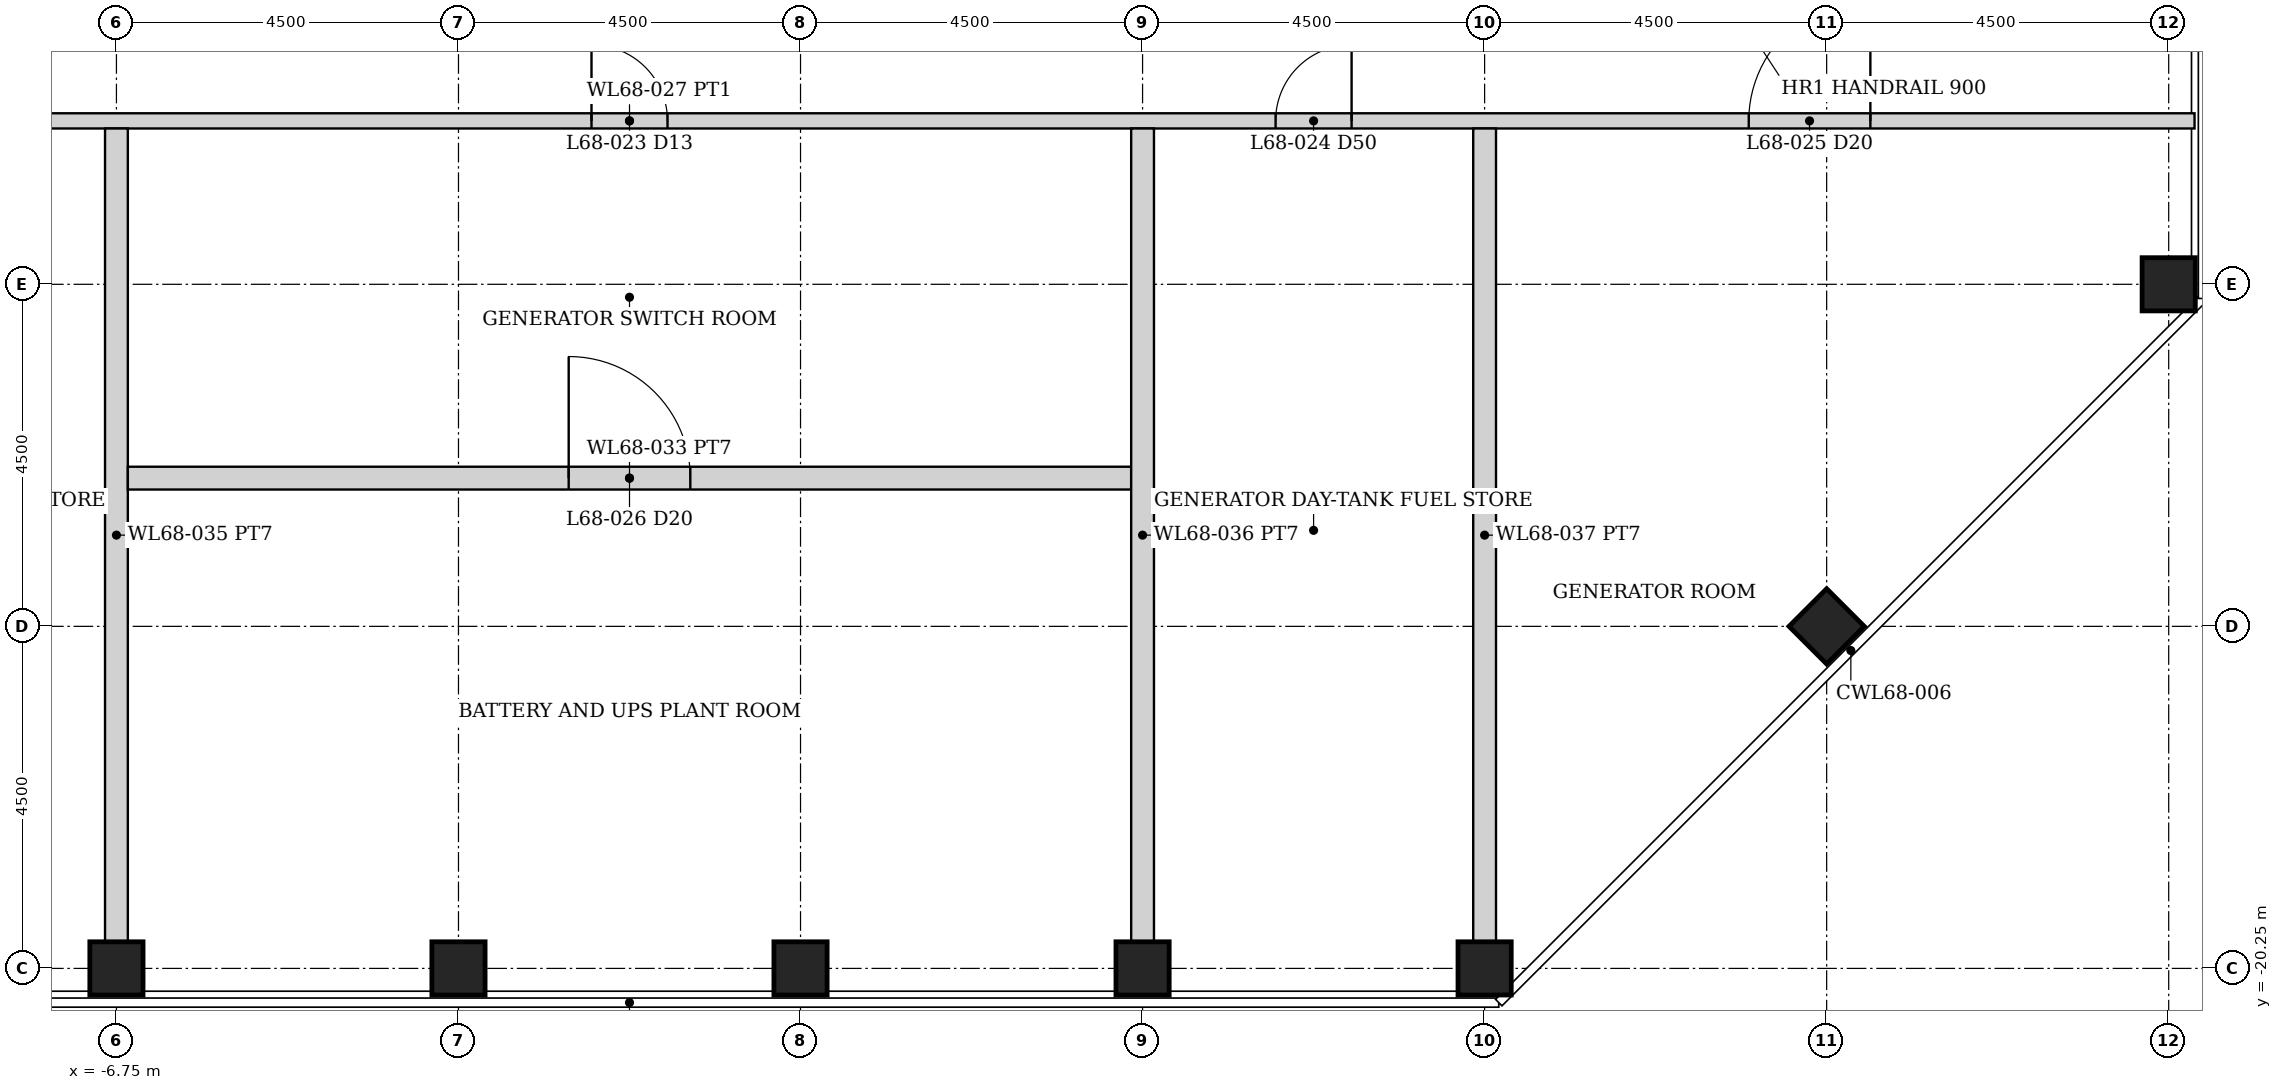
"""IFC4 building model, lengths in metres.
Left out: names, types, materials, properties, quantities, classifications, styles, units other than length and angle.
Written with IfcOpenShell. Run it as: python <this file> out.ifc"""

import sys

from ifc_helpers import new_model, si_unit, direction, frame, frame_2d, origin, origin_2d, place, context, subcontext, project, spatial, rectangle, hollow_rectangle, extrude, element, fill, save


model = new_model("IFC4")
c1 = context("Model", 3, precision=1e-05, world=origin(), true_north=direction((0.0, 1.0)))
c2 = subcontext(c1, "Body", "Model", "MODEL_VIEW")
j1 = project(units=[si_unit("LENGTHUNIT", "METRE"), si_unit("PLANEANGLEUNIT", "RADIAN")], contexts=[c1])
p1 = place(None, origin())
s1 = spatial("IfcSite", under=j1, at=p1, CompositionType="ELEMENT")
p2 = place(p1, origin())
s2 = spatial("IfcBuilding", under=s1, at=p2, CompositionType="ELEMENT")
p3 = place(p2, frame((0.0, 0.0, 262.05)))
s3 = spatial("IfcBuildingStorey", under=s2, at=p3, CompositionType="ELEMENT", Elevation=262.05)
for number, where, z_axis, x_axis in (
    (1, (20.25, -11.25, 0.0), (0.0, 0.0, 1.0), (1.0, 0.0, 0.0)),
    (2, (-6.75, -20.25, 0.0), (0.0, 0.0, 1.0), (0.0, 1.0, 0.0)),
    (3, (-2.25, -20.25, 0.0), (0.0, 0.0, 1.0), (0.0, 1.0, 0.0)),
    (4, (2.25, -20.25, 0.0), (0.0, 0.0, 1.0), (0.0, 1.0, 0.0)),
    (5, (6.75, -20.25, 0.0), (0.0, 0.0, 1.0), (0.0, 1.0, 0.0)),
    (6, (11.25, -20.25, 0.0), (0.0, 0.0, 1.0), (0.0, 1.0, 0.0)),
    (7, (15.75, -15.75, 0.0), (0.0, 0.0, 1.0), (0.707, -0.707, 0.0)),
):
    element("IfcColumn", number, at=place(p3, frame(where, z_axis=z_axis, x_axis=x_axis)), inside=s3, PredefinedType="COLUMN", context=c2, shape_type="SweptSolid", body=[
        extrude(hollow_rectangle(XDim=0.7, YDim=0.7, WallThickness=0.035, at=origin_2d()), origin(), (0.0, 0.0, 1.0), 6.0),
    ])
p4 = place(p3, frame((-20.59, -9.1, 0.0), z_axis=(0.0, 0.0, 1.0), x_axis=(1.0, 0.0, 0.0)))
e8 = element("IfcWall", 8, at=p4, inside=s3, PredefinedType="PARTITIONING", context=c2, shape_type="SweptSolid", body=[
    extrude(rectangle(XDim=41.18, YDim=0.2, at=frame_2d((20.59, 0.0))), origin(), (0.0, 0.0, 1.0), 4.823),
])
p5 = place(p4, frame((4.265, 0.0, 0.0)))
e9 = element("IfcOpeningElement", 9, at=p5, cuts=e8, PredefinedType="OPENING", context=c2, shape_type="SweptSolid", body=[
    extrude(rectangle(XDim=1.6, YDim=2.4, at=frame_2d((0.8, 1.2))), frame((0.0, 0.11, 0.0), z_axis=(0.0, -1.0, 0.0), x_axis=(1.0, 0.0, 0.0)), (0.0, 0.0, 1.0), 0.22),
])
p6 = place(p4, frame((11.09, 0.0, 0.0)))
e10 = element("IfcOpeningElement", 10, at=p6, cuts=e8, PredefinedType="OPENING", context=c2, shape_type="SweptSolid", body=[
    extrude(rectangle(XDim=1.0, YDim=2.1, at=frame_2d((0.5, 1.05))), frame((0.0, 0.11, 0.0), z_axis=(0.0, -1.0, 0.0), x_axis=(1.0, 0.0, 0.0)), (0.0, 0.0, 1.0), 0.22),
])
p7 = place(p4, frame((20.09, 0.0, 0.0)))
e11 = element("IfcOpeningElement", 11, at=p7, cuts=e8, PredefinedType="OPENING", context=c2, shape_type="SweptSolid", body=[
    extrude(rectangle(XDim=1.0, YDim=2.1, at=frame_2d((0.5, 1.05))), frame((0.0, 0.11, 0.0), z_axis=(0.0, -1.0, 0.0), x_axis=(1.0, 0.0, 0.0)), (0.0, 0.0, 1.0), 0.22),
])
p8 = place(p4, frame((29.09, 0.0, 0.0)))
e12 = element("IfcOpeningElement", 12, at=p8, cuts=e8, PredefinedType="OPENING", context=c2, shape_type="SweptSolid", body=[
    extrude(rectangle(XDim=1.0, YDim=2.1, at=frame_2d((0.5, 1.05))), frame((0.0, 0.11, 0.0), z_axis=(0.0, -1.0, 0.0), x_axis=(1.0, 0.0, 0.0)), (0.0, 0.0, 1.0), 0.22),
])
p9 = place(p4, frame((35.315, 0.0, 0.0)))
e13 = element("IfcOpeningElement", 13, at=p9, cuts=e8, PredefinedType="OPENING", context=c2, shape_type="SweptSolid", body=[
    extrude(rectangle(XDim=1.6, YDim=2.4, at=frame_2d((0.8, 1.2))), frame((0.0, 0.11, 0.0), z_axis=(0.0, -1.0, 0.0), x_axis=(1.0, 0.0, 0.0)), (0.0, 0.0, 1.0), 0.22),
])
p10 = place(p3, frame((-6.75, -19.9, 0.0), z_axis=(0.0, 0.0, 1.0), x_axis=(0.0, 1.0, 0.0)))
e14 = element("IfcWall", 14, at=p10, inside=s3, PredefinedType="PARTITIONING", context=c2, shape_type="SweptSolid", body=[
    extrude(rectangle(XDim=10.7, YDim=0.3, at=frame_2d((5.35, 0.0))), origin(), (0.0, 0.0, 1.0), 4.823),
])
p11 = place(p3, frame((-6.6, -13.8, 0.0), z_axis=(0.0, 0.0, 1.0), x_axis=(1.0, 0.0, 0.0)))
e15 = element("IfcWall", 15, at=p11, inside=s3, PredefinedType="PARTITIONING", context=c2, shape_type="SweptSolid", body=[
    extrude(rectangle(XDim=13.2, YDim=0.3, at=frame_2d((6.6, 0.0))), origin(), (0.0, 0.0, 1.0), 4.823),
])
p12 = place(p11, frame((5.8, 0.0, 0.0)))
e16 = element("IfcOpeningElement", 16, at=p12, cuts=e15, PredefinedType="OPENING", context=c2, shape_type="SweptSolid", body=[
    extrude(rectangle(XDim=1.6, YDim=2.4, at=frame_2d((0.8, 1.2))), frame((0.0, 0.16, 0.0), z_axis=(0.0, -1.0, 0.0), x_axis=(1.0, 0.0, 0.0)), (0.0, 0.0, 1.0), 0.32),
])
for number, where, z_axis, x_axis in (
    (17, (6.75, -19.9, 0.0), (0.0, 0.0, 1.0), (0.0, 1.0, 0.0)),
    (18, (11.25, -19.9, 0.0), (0.0, 0.0, 1.0), (0.0, 1.0, 0.0)),
):
    element("IfcWall", number, at=place(p3, frame(where, z_axis=z_axis, x_axis=x_axis)), inside=s3, PredefinedType="PARTITIONING", context=c2, shape_type="SweptSolid", body=[
        extrude(rectangle(XDim=10.7, YDim=0.3, at=frame_2d((5.35, 0.0))), origin(), (0.0, 0.0, 1.0), 4.823),
    ])
p13 = place(p7, origin())
e19 = element("IfcDoor", 19, at=p13, inside=s3, OperationType="SINGLE_SWING_LEFT", PredefinedType="DOOR", context=c2, shape_type="SweptSolid", body=[
    extrude(rectangle(XDim=1.0, YDim=2.1, at=frame_2d((0.5, 1.05))), frame((0.0, 0.025, 0.0), z_axis=(0.0, -1.0, 0.0), x_axis=(1.0, 0.0, 0.0)), (0.0, 0.0, 1.0), 0.05),
])
fill(e11, e19)
p14 = place(p12, origin())
e20 = element("IfcDoor", 20, at=p14, inside=s3, OperationType="SINGLE_SWING_LEFT", PredefinedType="DOOR", context=c2, shape_type="SweptSolid", body=[
    extrude(rectangle(XDim=1.6, YDim=2.4, at=frame_2d((0.8, 1.2))), frame((0.0, 0.025, 0.0), z_axis=(0.0, -1.0, 0.0), x_axis=(1.0, 0.0, 0.0)), (0.0, 0.0, 1.0), 0.05),
])
fill(e16, e20)
p15 = place(p8, origin())
e21 = element("IfcDoor", 21, at=p15, inside=s3, OperationType="SINGLE_SWING_RIGHT", PredefinedType="DOOR", context=c2, shape_type="SweptSolid", body=[
    extrude(rectangle(XDim=1.0, YDim=2.1, at=frame_2d((0.5, 1.05))), frame((0.0, 0.025, 0.0), z_axis=(0.0, -1.0, 0.0), x_axis=(1.0, 0.0, 0.0)), (0.0, 0.0, 1.0), 0.05),
])
fill(e12, e21)
p16 = place(p9, origin())
e22 = element("IfcDoor", 22, at=p16, inside=s3, OperationType="SINGLE_SWING_RIGHT", PredefinedType="DOOR", context=c2, shape_type="SweptSolid", body=[
    extrude(rectangle(XDim=1.6, YDim=2.4, at=frame_2d((0.8, 1.2))), frame((0.0, 0.025, 0.0), z_axis=(0.0, -1.0, 0.0), x_axis=(1.0, 0.0, 0.0)), (0.0, 0.0, 1.0), 0.05),
])
fill(e13, e22)
save(model, sys.argv[1])
